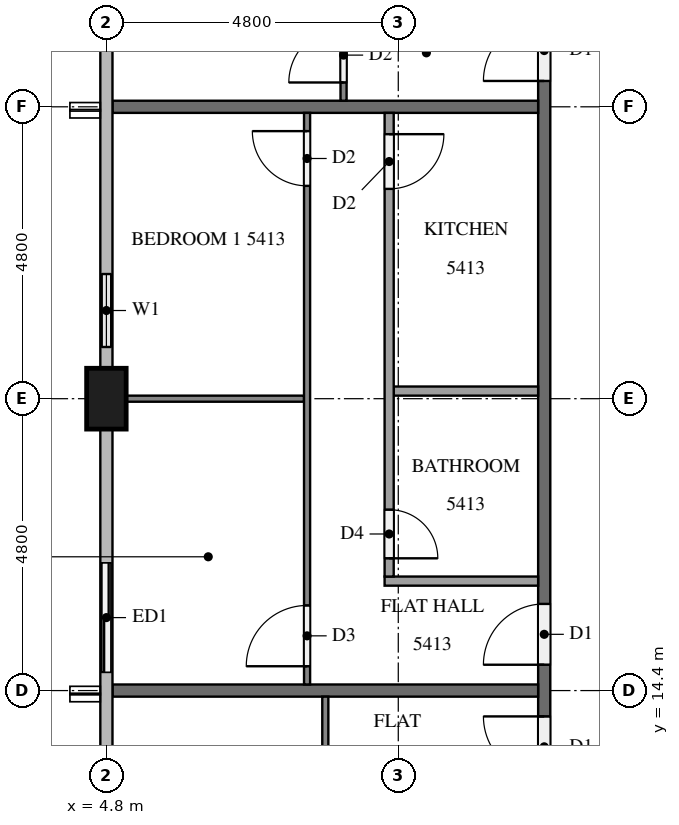
"""IFC4 building model, lengths in metres.
Left out: names, types, materials, properties, quantities, classifications, styles, units other than length and angle.
Written with IfcOpenShell. Run it as: python <this file> out.ifc"""

import sys

from ifc_helpers import new_model, si_unit, direction, frame, frame_2d, origin, origin_2d, place, context, subcontext, project, spatial, rectangle, extrude, element, fill, save


model = new_model("IFC4")
c1 = context("Model", 3, precision=1e-05, world=origin(), true_north=direction((0.0, 1.0)))
c2 = subcontext(c1, "Body", "Model", "MODEL_VIEW")
j1 = project(units=[si_unit("LENGTHUNIT", "METRE"), si_unit("PLANEANGLEUNIT", "RADIAN")], contexts=[c1])
p1 = place(None, origin())
s1 = spatial("IfcSite", under=j1, at=p1, CompositionType="ELEMENT")
p2 = place(p1, origin())
s2 = spatial("IfcBuilding", under=s1, at=p2, CompositionType="ELEMENT")
p3 = place(p2, frame((0.0, 0.0, 208.8)))
s3 = spatial("IfcBuildingStorey", under=s2, at=p3, CompositionType="ELEMENT", Elevation=208.8)
p4 = place(p3, frame((4.8, 19.2, 0.0), z_axis=(0.0, 0.0, 1.0), x_axis=(0.0, 1.0, 0.0)))
e1 = element("IfcColumn", 1, at=p4, inside=s3, PredefinedType="COLUMN", context=c2, shape_type="SweptSolid", body=[
    extrude(rectangle(XDim=1.0, YDim=0.65, at=origin_2d()), origin(), (0.0, 0.0, 1.0), 3.2),
])
p5 = place(p3, frame((4.8, 21.6, 0.0), z_axis=(0.0, 0.0, 1.0), x_axis=(0.0, -1.0, 0.0)))
e2 = element("IfcWall", 2, at=p5, inside=s3, PredefinedType="SOLIDWALL", context=c2, shape_type="SweptSolid", body=[
    extrude(rectangle(XDim=1.9, YDim=0.15, at=frame_2d((0.95, 0.0))), origin(), (0.0, 0.0, 1.0), 3.2),
])
p6 = place(p5, frame((0.35, 0.0, 0.9)))
e3 = element("IfcOpeningElement", 3, at=p6, cuts=e2, PredefinedType="OPENING", context=c2, shape_type="SweptSolid", body=[
    extrude(rectangle(XDim=1.2, YDim=1.4, at=frame_2d((0.6, 0.7))), frame((0.0, 0.085, 0.0), z_axis=(0.0, -1.0, 0.0), x_axis=(1.0, 0.0, 0.0)), (0.0, 0.0, 1.0), 0.17),
])
p7 = place(p3, frame((4.8, 16.8, 0.0), z_axis=(0.0, 0.0, 1.0), x_axis=(0.0, -1.0, 0.0)))
e4 = element("IfcWall", 4, at=p7, inside=s3, PredefinedType="SOLIDWALL", context=c2, shape_type="SweptSolid", body=[
    extrude(rectangle(XDim=2.4, YDim=0.15, at=frame_2d((1.2, 0.0))), origin(), (0.0, 0.0, 1.0), 3.2),
])
p8 = place(p7, frame((0.3, 0.0, 0.0)))
e5 = element("IfcOpeningElement", 5, at=p8, cuts=e4, PredefinedType="OPENING", context=c2, shape_type="SweptSolid", body=[
    extrude(rectangle(XDim=1.8, YDim=2.4, at=frame_2d((0.9, 1.2))), frame((0.0, 0.085, 0.0), z_axis=(0.0, -1.0, 0.0), x_axis=(1.0, 0.0, 0.0)), (0.0, 0.0, 1.0), 0.17),
])
p9 = place(p3, frame((12.0, 12.1, 0.0), z_axis=(0.0, 0.0, 1.0), x_axis=(0.0, 1.0, 0.0)))
e6 = element("IfcWall", 6, at=p9, inside=s3, PredefinedType="PARTITIONING", context=c2, shape_type="SweptSolid", body=[
    extrude(rectangle(XDim=28.6, YDim=0.2, at=frame_2d((14.3, 0.0))), origin(), (0.0, 0.0, 1.0), 3.2),
])
p10 = place(p9, frame((27.275, 0.0, 0.0)))
e7 = element("IfcOpeningElement", 7, at=p10, cuts=e6, PredefinedType="OPENING", context=c2, shape_type="SweptSolid", body=[
    extrude(rectangle(XDim=1.0, YDim=2.1, at=frame_2d((0.5, 1.05))), frame((0.0, 0.11, 0.0), z_axis=(0.0, -1.0, 0.0), x_axis=(1.0, 0.0, 0.0)), (0.0, 0.0, 1.0), 0.22),
])
p11 = place(p9, frame((12.325, 0.0, 0.0)))
e8 = element("IfcOpeningElement", 8, at=p11, cuts=e6, PredefinedType="OPENING", context=c2, shape_type="SweptSolid", body=[
    extrude(rectangle(XDim=1.0, YDim=2.1, at=frame_2d((0.5, 1.05))), frame((0.0, 0.11, 0.0), z_axis=(0.0, -1.0, 0.0), x_axis=(1.0, 0.0, 0.0)), (0.0, 0.0, 1.0), 0.22),
])
p12 = place(p9, frame((2.725, 0.0, 0.0)))
e9 = element("IfcOpeningElement", 9, at=p12, cuts=e6, PredefinedType="OPENING", context=c2, shape_type="SweptSolid", body=[
    extrude(rectangle(XDim=1.0, YDim=2.1, at=frame_2d((0.5, 1.05))), frame((0.0, 0.11, 0.0), z_axis=(0.0, -1.0, 0.0), x_axis=(1.0, 0.0, 0.0)), (0.0, 0.0, 1.0), 0.22),
])
p13 = place(p9, frame((0.875, 0.0, 0.0)))
e10 = element("IfcOpeningElement", 10, at=p13, cuts=e6, PredefinedType="OPENING", context=c2, shape_type="SweptSolid", body=[
    extrude(rectangle(XDim=1.0, YDim=2.1, at=frame_2d((0.5, 1.05))), frame((0.0, 0.11, 0.0), z_axis=(0.0, -1.0, 0.0), x_axis=(1.0, 0.0, 0.0)), (0.0, 0.0, 1.0), 0.22),
])
for number, where, z_axis, x_axis in (
    (11, (4.9, 24.0, 0.0), (0.0, 0.0, 1.0), (1.0, 0.0, 0.0)),
    (12, (4.9, 14.4, 0.0), (0.0, 0.0, 1.0), (1.0, 0.0, 0.0)),
):
    element("IfcWall", number, at=place(p3, frame(where, z_axis=z_axis, x_axis=x_axis)), inside=s3, PredefinedType="PARTITIONING", context=c2, shape_type="SweptSolid", body=[
        extrude(rectangle(XDim=7.0, YDim=0.2, at=frame_2d((3.5, 0.0))), origin(), (0.0, 0.0, 1.0), 3.2),
    ])
p14 = place(p3, frame((8.7, 24.1, 0.0), z_axis=(0.0, 0.0, 1.0), x_axis=(0.0, 1.0, 0.0)))
e13 = element("IfcWall", 13, at=p14, inside=s3, PredefinedType="PARTITIONING", context=c2, shape_type="SweptSolid", body=[
    extrude(rectangle(XDim=9.4, YDim=0.1, at=frame_2d((4.7, 0.0))), origin(), (0.0, 0.0, 1.0), 3.2),
])
p15 = place(p14, frame((0.3, 0.0, 0.0)))
e14 = element("IfcOpeningElement", 14, at=p15, cuts=e13, PredefinedType="OPENING", context=c2, shape_type="SweptSolid", body=[
    extrude(rectangle(XDim=0.9, YDim=2.1, at=frame_2d((0.45, 1.05))), frame((0.0, 0.06, 0.0), z_axis=(0.0, -1.0, 0.0), x_axis=(1.0, 0.0, 0.0)), (0.0, 0.0, 1.0), 0.12),
])
p16 = place(p14, frame((8.1, 0.0, 0.0)))
e15 = element("IfcOpeningElement", 15, at=p16, cuts=e13, PredefinedType="OPENING", context=c2, shape_type="SweptSolid", body=[
    extrude(rectangle(XDim=1.0, YDim=2.1, at=frame_2d((0.5, 1.05))), frame((0.0, 0.06, 0.0), z_axis=(0.0, -1.0, 0.0), x_axis=(1.0, 0.0, 0.0)), (0.0, 0.0, 1.0), 0.12),
])
p17 = place(p3, frame((8.05, 19.2, 0.0), z_axis=(0.0, 0.0, 1.0), x_axis=(-1.0, 0.0, 0.0)))
e16 = element("IfcWall", 16, at=p17, inside=s3, PredefinedType="PARTITIONING", context=c2, shape_type="SweptSolid", body=[
    extrude(rectangle(XDim=2.925, YDim=0.1, at=frame_2d((1.462, 0.0))), origin(), (0.0, 0.0, 1.0), 3.2),
])
p18 = place(p3, frame((8.1, 14.5, 0.0), z_axis=(0.0, 0.0, 1.0), x_axis=(0.0, 1.0, 0.0)))
e17 = element("IfcWall", 17, at=p18, inside=s3, PredefinedType="PARTITIONING", context=c2, shape_type="SweptSolid", body=[
    extrude(rectangle(XDim=9.4, YDim=0.1, at=frame_2d((4.7, 0.0))), origin(), (0.0, 0.0, 1.0), 3.2),
])
p19 = place(p18, frame((0.3, 0.0, 0.0)))
e18 = element("IfcOpeningElement", 18, at=p19, cuts=e17, PredefinedType="OPENING", context=c2, shape_type="SweptSolid", body=[
    extrude(rectangle(XDim=1.0, YDim=2.1, at=frame_2d((0.5, 1.05))), frame((0.0, 0.06, 0.0), z_axis=(0.0, -1.0, 0.0), x_axis=(1.0, 0.0, 0.0)), (0.0, 0.0, 1.0), 0.12),
])
p20 = place(p18, frame((8.2, 0.0, 0.0)))
e19 = element("IfcOpeningElement", 19, at=p20, cuts=e17, PredefinedType="OPENING", context=c2, shape_type="SweptSolid", body=[
    extrude(rectangle(XDim=0.9, YDim=2.1, at=frame_2d((0.45, 1.05))), frame((0.0, 0.06, 0.0), z_axis=(0.0, -1.0, 0.0), x_axis=(1.0, 0.0, 0.0)), (0.0, 0.0, 1.0), 0.12),
])
p21 = place(p3, frame((11.9, 19.325, 0.0), z_axis=(0.0, 0.0, 1.0), x_axis=(-1.0, 0.0, 0.0)))
e20 = element("IfcWall", 20, at=p21, inside=s3, PredefinedType="PARTITIONING", context=c2, shape_type="SweptSolid", body=[
    extrude(rectangle(XDim=2.375, YDim=0.15, at=frame_2d((1.188, 0.0))), origin(), (0.0, 0.0, 1.0), 3.2),
])
p22 = place(p3, frame((11.9, 16.2, 0.0), z_axis=(0.0, 0.0, 1.0), x_axis=(-1.0, 0.0, 0.0)))
e21 = element("IfcWall", 21, at=p22, inside=s3, PredefinedType="PARTITIONING", context=c2, shape_type="SweptSolid", body=[
    extrude(rectangle(XDim=2.525, YDim=0.15, at=frame_2d((1.262, 0.0))), origin(), (0.0, 0.0, 1.0), 3.2),
])
p23 = place(p3, frame((9.45, 23.9, 0.0), z_axis=(0.0, 0.0, 1.0), x_axis=(0.0, -1.0, 0.0)))
e22 = element("IfcWall", 22, at=p23, inside=s3, PredefinedType="PARTITIONING", context=c2, shape_type="SweptSolid", body=[
    extrude(rectangle(XDim=7.625, YDim=0.15, at=frame_2d((3.812, 0.0))), origin(), (0.0, 0.0, 1.0), 3.2),
])
p24 = place(p23, frame((6.525, 0.0, 0.0)))
e23 = element("IfcOpeningElement", 23, at=p24, cuts=e22, PredefinedType="OPENING", context=c2, shape_type="SweptSolid", body=[
    extrude(rectangle(XDim=0.8, YDim=2.1, at=frame_2d((0.4, 1.05))), frame((0.0, 0.085, 0.0), z_axis=(0.0, -1.0, 0.0), x_axis=(1.0, 0.0, 0.0)), (0.0, 0.0, 1.0), 0.17),
])
p25 = place(p23, frame((0.35, 0.0, 0.0)))
e24 = element("IfcOpeningElement", 24, at=p25, cuts=e22, PredefinedType="OPENING", context=c2, shape_type="SweptSolid", body=[
    extrude(rectangle(XDim=0.9, YDim=2.1, at=frame_2d((0.45, 1.05))), frame((0.0, 0.085, 0.0), z_axis=(0.0, -1.0, 0.0), x_axis=(1.0, 0.0, 0.0)), (0.0, 0.0, 1.0), 0.17),
])
p26 = place(p3, frame((8.4, 5.221, 0.0), z_axis=(0.0, 0.0, 1.0), x_axis=(0.0, 1.0, 0.0)))
e25 = element("IfcWall", 25, at=p26, inside=s3, PredefinedType="PARTITIONING", context=c2, shape_type="SweptSolid", body=[
    extrude(rectangle(XDim=9.079, YDim=0.1, at=frame_2d((4.539, 0.0))), origin(), (0.0, 0.0, 1.0), 3.2),
])
p27 = place(p26, frame((4.729, 0.0, 0.0)))
e26 = element("IfcOpeningElement", 26, at=p27, cuts=e25, PredefinedType="OPENING", context=c2, shape_type="SweptSolid", body=[
    extrude(rectangle(XDim=0.9, YDim=2.1, at=frame_2d((0.45, 1.05))), frame((0.0, 0.06, 0.0), z_axis=(0.0, -1.0, 0.0), x_axis=(1.0, 0.0, 0.0)), (0.0, 0.0, 1.0), 0.12),
])
p28 = place(p26, frame((3.029, 0.0, 0.0)))
e27 = element("IfcOpeningElement", 27, at=p28, cuts=e25, PredefinedType="OPENING", context=c2, shape_type="SweptSolid", body=[
    extrude(rectangle(XDim=1.0, YDim=2.1, at=frame_2d((0.5, 1.05))), frame((0.0, 0.06, 0.0), z_axis=(0.0, -1.0, 0.0), x_axis=(1.0, 0.0, 0.0)), (0.0, 0.0, 1.0), 0.12),
])
p29 = place(p6, origin())
e28 = element("IfcWindow", 28, at=p29, inside=s3, PartitioningType="SINGLE_PANEL", PredefinedType="WINDOW", context=c2, shape_type="SweptSolid", body=[
    extrude(rectangle(XDim=1.2, YDim=1.4, at=frame_2d((0.6, 0.7))), frame((0.0, 0.03, 0.0), z_axis=(0.0, -1.0, 0.0), x_axis=(1.0, 0.0, 0.0)), (0.0, 0.0, 1.0), 0.06),
])
fill(e3, e28)
p30 = place(p8, origin())
e29 = element("IfcDoor", 29, at=p30, inside=s3, OperationType="SLIDING_TO_RIGHT", PredefinedType="DOOR", context=c2, shape_type="SweptSolid", body=[
    extrude(rectangle(XDim=1.8, YDim=2.4, at=frame_2d((0.9, 1.2))), frame((0.0, 0.025, 0.0), z_axis=(0.0, -1.0, 0.0), x_axis=(1.0, 0.0, 0.0)), (0.0, 0.0, 1.0), 0.05),
])
fill(e5, e29)
p31 = place(p11, origin())
e30 = element("IfcDoor", 30, at=p31, inside=s3, OperationType="SINGLE_SWING_LEFT", PredefinedType="DOOR", context=c2, shape_type="SweptSolid", body=[
    extrude(rectangle(XDim=1.0, YDim=2.1, at=frame_2d((0.5, 1.05))), frame((0.0, 0.025, 0.0), z_axis=(0.0, -1.0, 0.0), x_axis=(1.0, 0.0, 0.0)), (0.0, 0.0, 1.0), 0.05),
])
fill(e8, e30)
p32 = place(p12, origin())
e31 = element("IfcDoor", 31, at=p32, inside=s3, OperationType="SINGLE_SWING_LEFT", PredefinedType="DOOR", context=c2, shape_type="SweptSolid", body=[
    extrude(rectangle(XDim=1.0, YDim=2.1, at=frame_2d((0.5, 1.05))), frame((0.0, 0.025, 0.0), z_axis=(0.0, -1.0, 0.0), x_axis=(1.0, 0.0, 0.0)), (0.0, 0.0, 1.0), 0.05),
])
fill(e9, e31)
p33 = place(p13, origin())
e32 = element("IfcDoor", 32, at=p33, inside=s3, OperationType="SINGLE_SWING_RIGHT", PredefinedType="DOOR", context=c2, shape_type="SweptSolid", body=[
    extrude(rectangle(XDim=1.0, YDim=2.1, at=frame_2d((0.5, 1.05))), frame((0.0, 0.025, 0.0), z_axis=(0.0, -1.0, 0.0), x_axis=(1.0, 0.0, 0.0)), (0.0, 0.0, 1.0), 0.05),
])
fill(e10, e32)
p34 = place(p15, origin())
e33 = element("IfcDoor", 33, at=p34, inside=s3, OperationType="SINGLE_SWING_LEFT", PredefinedType="DOOR", context=c2, shape_type="SweptSolid", body=[
    extrude(rectangle(XDim=0.9, YDim=2.1, at=frame_2d((0.45, 1.05))), frame((0.0, 0.025, 0.0), z_axis=(0.0, -1.0, 0.0), x_axis=(1.0, 0.0, 0.0)), (0.0, 0.0, 1.0), 0.05),
])
fill(e14, e33)
p35 = place(p19, origin())
e34 = element("IfcDoor", 34, at=p35, inside=s3, OperationType="SINGLE_SWING_LEFT", PredefinedType="DOOR", context=c2, shape_type="SweptSolid", body=[
    extrude(rectangle(XDim=1.0, YDim=2.1, at=frame_2d((0.5, 1.05))), frame((0.0, 0.025, 0.0), z_axis=(0.0, -1.0, 0.0), x_axis=(1.0, 0.0, 0.0)), (0.0, 0.0, 1.0), 0.05),
])
fill(e18, e34)
p36 = place(p20, origin())
e35 = element("IfcDoor", 35, at=p36, inside=s3, OperationType="SINGLE_SWING_RIGHT", PredefinedType="DOOR", context=c2, shape_type="SweptSolid", body=[
    extrude(rectangle(XDim=0.9, YDim=2.1, at=frame_2d((0.45, 1.05))), frame((0.0, 0.025, 0.0), z_axis=(0.0, -1.0, 0.0), x_axis=(1.0, 0.0, 0.0)), (0.0, 0.0, 1.0), 0.05),
])
fill(e19, e35)
p37 = place(p24, origin())
e36 = element("IfcDoor", 36, at=p37, inside=s3, OperationType="SINGLE_SWING_RIGHT", PredefinedType="DOOR", context=c2, shape_type="SweptSolid", body=[
    extrude(rectangle(XDim=0.8, YDim=2.1, at=frame_2d((0.4, 1.05))), frame((0.0, 0.025, 0.0), z_axis=(0.0, -1.0, 0.0), x_axis=(1.0, 0.0, 0.0)), (0.0, 0.0, 1.0), 0.05),
])
fill(e23, e36)
p38 = place(p25, origin())
e37 = element("IfcDoor", 37, at=p38, inside=s3, OperationType="SINGLE_SWING_LEFT", PredefinedType="DOOR", context=c2, shape_type="SweptSolid", body=[
    extrude(rectangle(XDim=0.9, YDim=2.1, at=frame_2d((0.45, 1.05))), frame((0.0, 0.025, 0.0), z_axis=(0.0, -1.0, 0.0), x_axis=(1.0, 0.0, 0.0)), (0.0, 0.0, 1.0), 0.05),
])
fill(e24, e37)
save(model, sys.argv[1])
